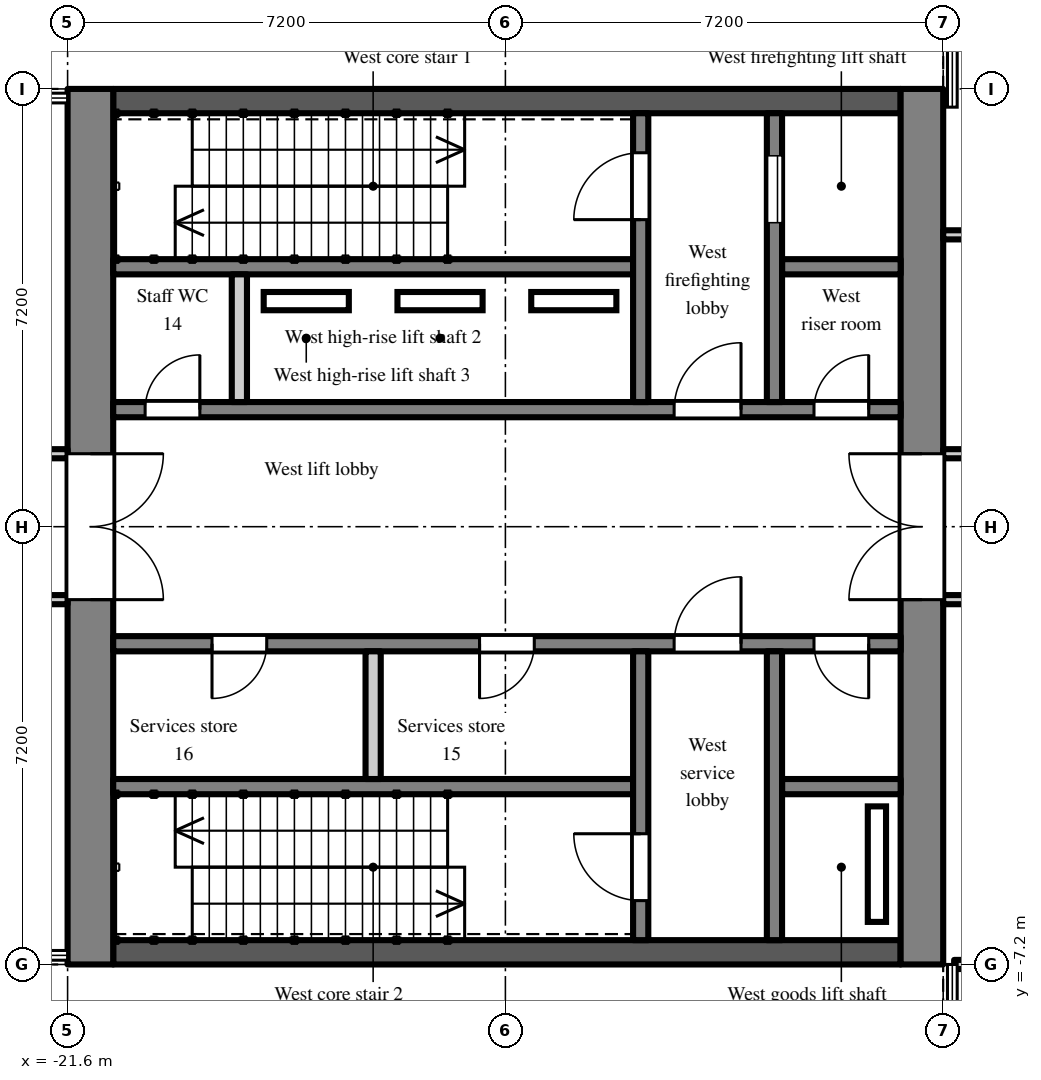
"""IFC4 building model, lengths in metres.
Left out: names, types, materials, properties, quantities, classifications, styles, units other than length and angle.
Written with IfcOpenShell. Run it as: python <this file> out.ifc"""

import sys

from ifc_helpers import new_model, si_unit, direction, frame, frame_2d, origin, place, context, subcontext, project, spatial, rectangle, extrude, element, fill, save


model = new_model("IFC4")
c1 = context("Model", 3, precision=1e-05, world=origin(), true_north=direction((0.0, 1.0)))
c2 = subcontext(c1, "Body", "Model", "MODEL_VIEW")
j1 = project(units=[si_unit("LENGTHUNIT", "METRE"), si_unit("PLANEANGLEUNIT", "RADIAN")], contexts=[c1])
p1 = place(None, origin())
s1 = spatial("IfcSite", under=j1, at=p1, CompositionType="ELEMENT")
p2 = place(p1, origin())
s2 = spatial("IfcBuilding", under=s1, at=p2, CompositionType="ELEMENT")
p3 = place(p2, frame((0.0, 0.0, 242.1)))
s3 = spatial("IfcBuildingStorey", under=s2, at=p3, CompositionType="ELEMENT", Elevation=242.1)
p4 = place(p3, frame((-7.55, -7.2, 0.0), z_axis=(0.0, 0.0, 1.0), x_axis=(0.0, 1.0, 0.0)))
e1 = element("IfcWall", 1, at=p4, inside=s3, PredefinedType="SHEAR", context=c2, shape_type="SweptSolid", body=[
    extrude(rectangle(XDim=14.4, YDim=0.7, at=frame_2d((7.2, 0.0))), origin(), (0.0, 0.0, 1.0), 4.95),
])
p5 = place(p4, frame((6.0, 0.0, 0.0)))
e2 = element("IfcOpeningElement", 2, at=p5, cuts=e1, PredefinedType="OPENING", context=c2, shape_type="SweptSolid", body=[
    extrude(rectangle(XDim=2.4, YDim=2.2, at=frame_2d((1.2, 1.1))), frame((0.0, 0.36, 0.0), z_axis=(0.0, -1.0, 0.0), x_axis=(1.0, 0.0, 0.0)), (0.0, 0.0, 1.0), 0.72),
])
p6 = place(p3, frame((-21.225, -7.2, 0.0), z_axis=(0.0, 0.0, 1.0), x_axis=(0.0, 1.0, 0.0)))
e3 = element("IfcWall", 3, at=p6, inside=s3, PredefinedType="SHEAR", context=c2, shape_type="SweptSolid", body=[
    extrude(rectangle(XDim=14.4, YDim=0.75, at=frame_2d((7.2, 0.0))), origin(), (0.0, 0.0, 1.0), 4.95),
])
p7 = place(p6, frame((6.0, 0.0, 0.0)))
e4 = element("IfcOpeningElement", 4, at=p7, cuts=e3, PredefinedType="OPENING", context=c2, shape_type="SweptSolid", body=[
    extrude(rectangle(XDim=2.4, YDim=2.2, at=frame_2d((1.2, 1.1))), frame((0.0, 0.385, 0.0), z_axis=(0.0, -1.0, 0.0), x_axis=(1.0, 0.0, 0.0)), (0.0, 0.0, 1.0), 0.77),
])
p8 = place(p3, frame((-7.9, 7.0, 0.0), z_axis=(0.0, 0.0, 1.0), x_axis=(-1.0, 0.0, 0.0)))
e5 = element("IfcWall", 5, at=p8, inside=s3, PredefinedType="SHEAR", context=c2, shape_type="SweptSolid", body=[
    extrude(rectangle(XDim=12.95, YDim=0.4, at=frame_2d((6.475, 0.0))), origin(), (0.0, 0.0, 1.0), 4.95),
])
p9 = place(p3, frame((-7.9, 1.925, 0.0), z_axis=(0.0, 0.0, 1.0), x_axis=(-1.0, 0.0, 0.0)))
e6 = element("IfcWall", 6, at=p9, inside=s3, PredefinedType="SHEAR", context=c2, shape_type="SweptSolid", body=[
    extrude(rectangle(XDim=12.95, YDim=0.25, at=frame_2d((6.475, 0.0))), origin(), (0.0, 0.0, 1.0), 4.95),
])
p10 = place(p9, frame((0.525, 0.0, 0.0)))
e7 = element("IfcOpeningElement", 7, at=p10, cuts=e6, PredefinedType="OPENING", context=c2, shape_type="SweptSolid", body=[
    extrude(rectangle(XDim=0.9, YDim=2.1, at=frame_2d((0.45, 1.05))), frame((0.0, 0.135, 0.0), z_axis=(0.0, -1.0, 0.0), x_axis=(1.0, 0.0, 0.0)), (0.0, 0.0, 1.0), 0.27),
])
p11 = place(p9, frame((2.625, 0.0, 0.0)))
e8 = element("IfcOpeningElement", 8, at=p11, cuts=e6, PredefinedType="OPENING", context=c2, shape_type="SweptSolid", body=[
    extrude(rectangle(XDim=1.1, YDim=2.1, at=frame_2d((0.55, 1.05))), frame((0.0, 0.135, 0.0), z_axis=(0.0, -1.0, 0.0), x_axis=(1.0, 0.0, 0.0)), (0.0, 0.0, 1.0), 0.27),
])
p12 = place(p9, frame((11.525, 0.0, 0.0)))
e9 = element("IfcOpeningElement", 9, at=p12, cuts=e6, PredefinedType="OPENING", context=c2, shape_type="SweptSolid", body=[
    extrude(rectangle(XDim=0.9, YDim=2.1, at=frame_2d((0.45, 1.05))), frame((0.0, 0.135, 0.0), z_axis=(0.0, -1.0, 0.0), x_axis=(1.0, 0.0, 0.0)), (0.0, 0.0, 1.0), 0.27),
])
p13 = place(p3, frame((-7.9, 4.275, 0.0), z_axis=(0.0, 0.0, 1.0), x_axis=(-1.0, 0.0, 0.0)))
e10 = element("IfcWall", 10, at=p13, inside=s3, PredefinedType="SHEAR", context=c2, shape_type="SweptSolid", body=[
    extrude(rectangle(XDim=1.95, YDim=0.25, at=frame_2d((0.975, 0.0))), origin(), (0.0, 0.0, 1.0), 4.95),
])
p14 = place(p3, frame((-12.3, 4.275, 0.0), z_axis=(0.0, 0.0, 1.0), x_axis=(-1.0, 0.0, 0.0)))
e11 = element("IfcWall", 11, at=p14, inside=s3, PredefinedType="SHEAR", context=c2, shape_type="SweptSolid", body=[
    extrude(rectangle(XDim=8.55, YDim=0.25, at=frame_2d((4.275, 0.0))), origin(), (0.0, 0.0, 1.0), 4.95),
])
p15 = place(p3, frame((-9.975, 2.05, 0.0), z_axis=(0.0, 0.0, 1.0), x_axis=(0.0, 1.0, 0.0)))
e12 = element("IfcWall", 12, at=p15, inside=s3, PredefinedType="SHEAR", context=c2, shape_type="SweptSolid", body=[
    extrude(rectangle(XDim=4.75, YDim=0.25, at=frame_2d((2.375, 0.0))), origin(), (0.0, 0.0, 1.0), 4.95),
])
p16 = place(p15, frame((2.95, 0.0, 0.0)))
e13 = element("IfcOpeningElement", 13, at=p16, cuts=e12, PredefinedType="OPENING", context=c2, shape_type="SweptSolid", body=[
    extrude(rectangle(XDim=1.1, YDim=2.1, at=frame_2d((0.55, 1.05))), frame((0.0, 0.135, 0.0), z_axis=(0.0, -1.0, 0.0), x_axis=(1.0, 0.0, 0.0)), (0.0, 0.0, 1.0), 0.27),
])
p17 = place(p3, frame((-12.175, 2.05, 0.0), z_axis=(0.0, 0.0, 1.0), x_axis=(0.0, 1.0, 0.0)))
e14 = element("IfcWall", 14, at=p17, inside=s3, PredefinedType="SHEAR", context=c2, shape_type="SweptSolid", body=[
    extrude(rectangle(XDim=4.75, YDim=0.25, at=frame_2d((2.375, 0.0))), origin(), (0.0, 0.0, 1.0), 4.95),
])
p18 = place(p17, frame((3.0, 0.0, 0.0)))
e15 = element("IfcOpeningElement", 15, at=p18, cuts=e14, PredefinedType="OPENING", context=c2, shape_type="SweptSolid", body=[
    extrude(rectangle(XDim=1.1, YDim=2.1, at=frame_2d((0.55, 1.05))), frame((0.0, 0.135, 0.0), z_axis=(0.0, -1.0, 0.0), x_axis=(1.0, 0.0, 0.0)), (0.0, 0.0, 1.0), 0.27),
])
p19 = place(p3, frame((-18.775, 2.05, 0.0), z_axis=(0.0, 0.0, 1.0), x_axis=(0.0, 1.0, 0.0)))
e16 = element("IfcWall", 16, at=p19, inside=s3, PredefinedType="PARTITIONING", context=c2, shape_type="SweptSolid", body=[
    extrude(rectangle(XDim=2.1, YDim=0.25, at=frame_2d((1.05, 0.0))), origin(), (0.0, 0.0, 1.0), 4.95),
])
p20 = place(p3, frame((-7.9, -7.0, 0.0), z_axis=(0.0, 0.0, 1.0), x_axis=(-1.0, 0.0, 0.0)))
e17 = element("IfcWall", 17, at=p20, inside=s3, PredefinedType="SHEAR", context=c2, shape_type="SweptSolid", body=[
    extrude(rectangle(XDim=12.95, YDim=0.4, at=frame_2d((6.475, 0.0))), origin(), (0.0, 0.0, 1.0), 4.95),
])
p21 = place(p3, frame((-7.9, -1.925, 0.0), z_axis=(0.0, 0.0, 1.0), x_axis=(-1.0, 0.0, 0.0)))
e18 = element("IfcWall", 18, at=p21, inside=s3, PredefinedType="SHEAR", context=c2, shape_type="SweptSolid", body=[
    extrude(rectangle(XDim=12.95, YDim=0.25, at=frame_2d((6.475, 0.0))), origin(), (0.0, 0.0, 1.0), 4.95),
])
p22 = place(p21, frame((0.525, 0.0, 0.0)))
e19 = element("IfcOpeningElement", 19, at=p22, cuts=e18, PredefinedType="OPENING", context=c2, shape_type="SweptSolid", body=[
    extrude(rectangle(XDim=0.9, YDim=2.1, at=frame_2d((0.45, 1.05))), frame((0.0, 0.135, 0.0), z_axis=(0.0, -1.0, 0.0), x_axis=(1.0, 0.0, 0.0)), (0.0, 0.0, 1.0), 0.27),
])
p23 = place(p21, frame((2.625, 0.0, 0.0)))
e20 = element("IfcOpeningElement", 20, at=p23, cuts=e18, PredefinedType="OPENING", context=c2, shape_type="SweptSolid", body=[
    extrude(rectangle(XDim=1.1, YDim=2.1, at=frame_2d((0.55, 1.05))), frame((0.0, 0.135, 0.0), z_axis=(0.0, -1.0, 0.0), x_axis=(1.0, 0.0, 0.0)), (0.0, 0.0, 1.0), 0.27),
])
p24 = place(p21, frame((6.025, 0.0, 0.0)))
e21 = element("IfcOpeningElement", 21, at=p24, cuts=e18, PredefinedType="OPENING", context=c2, shape_type="SweptSolid", body=[
    extrude(rectangle(XDim=0.9, YDim=2.1, at=frame_2d((0.45, 1.05))), frame((0.0, 0.135, 0.0), z_axis=(0.0, -1.0, 0.0), x_axis=(1.0, 0.0, 0.0)), (0.0, 0.0, 1.0), 0.27),
])
p25 = place(p21, frame((10.425, 0.0, 0.0)))
e22 = element("IfcOpeningElement", 22, at=p25, cuts=e18, PredefinedType="OPENING", context=c2, shape_type="SweptSolid", body=[
    extrude(rectangle(XDim=0.9, YDim=2.1, at=frame_2d((0.45, 1.05))), frame((0.0, 0.135, 0.0), z_axis=(0.0, -1.0, 0.0), x_axis=(1.0, 0.0, 0.0)), (0.0, 0.0, 1.0), 0.27),
])
p26 = place(p3, frame((-7.9, -4.275, 0.0), z_axis=(0.0, 0.0, 1.0), x_axis=(-1.0, 0.0, 0.0)))
e23 = element("IfcWall", 23, at=p26, inside=s3, PredefinedType="SHEAR", context=c2, shape_type="SweptSolid", body=[
    extrude(rectangle(XDim=1.95, YDim=0.25, at=frame_2d((0.975, 0.0))), origin(), (0.0, 0.0, 1.0), 4.95),
])
p27 = place(p3, frame((-12.3, -4.275, 0.0), z_axis=(0.0, 0.0, 1.0), x_axis=(-1.0, 0.0, 0.0)))
e24 = element("IfcWall", 24, at=p27, inside=s3, PredefinedType="SHEAR", context=c2, shape_type="SweptSolid", body=[
    extrude(rectangle(XDim=8.55, YDim=0.25, at=frame_2d((4.275, 0.0))), origin(), (0.0, 0.0, 1.0), 4.95),
])
p28 = place(p3, frame((-9.975, -2.05, 0.0), z_axis=(0.0, 0.0, 1.0), x_axis=(0.0, -1.0, 0.0)))
e25 = element("IfcWall", 25, at=p28, inside=s3, PredefinedType="SHEAR", context=c2, shape_type="SweptSolid", body=[
    extrude(rectangle(XDim=4.75, YDim=0.25, at=frame_2d((2.375, 0.0))), origin(), (0.0, 0.0, 1.0), 4.95),
])
p29 = place(p3, frame((-12.175, -2.05, 0.0), z_axis=(0.0, 0.0, 1.0), x_axis=(0.0, -1.0, 0.0)))
e26 = element("IfcWall", 26, at=p29, inside=s3, PredefinedType="SHEAR", context=c2, shape_type="SweptSolid", body=[
    extrude(rectangle(XDim=4.75, YDim=0.25, at=frame_2d((2.375, 0.0))), origin(), (0.0, 0.0, 1.0), 4.95),
])
p30 = place(p29, frame((3.0, 0.0, 0.0)))
e27 = element("IfcOpeningElement", 27, at=p30, cuts=e26, PredefinedType="OPENING", context=c2, shape_type="SweptSolid", body=[
    extrude(rectangle(XDim=1.1, YDim=2.1, at=frame_2d((0.55, 1.05))), frame((0.0, 0.135, 0.0), z_axis=(0.0, -1.0, 0.0), x_axis=(1.0, 0.0, 0.0)), (0.0, 0.0, 1.0), 0.27),
])
p31 = place(p3, frame((-16.575, -2.05, 0.0), z_axis=(0.0, 0.0, 1.0), x_axis=(0.0, -1.0, 0.0)))
e28 = element("IfcWall", 28, at=p31, inside=s3, PredefinedType="PARTITIONING", context=c2, shape_type="SweptSolid", body=[
    extrude(rectangle(XDim=2.1, YDim=0.25, at=frame_2d((1.05, 0.0))), origin(), (0.0, 0.0, 1.0), 4.95),
])
p32 = place(p3, frame((-25.125, -1.2, 0.0), z_axis=(0.0, 0.0, 1.0), x_axis=(1.0, 0.0, 0.0)))
e29 = element("IfcWall", 29, at=p32, inside=s3, PredefinedType="PARTITIONING", context=c2, shape_type="SweptSolid", body=[
    extrude(rectangle(XDim=3.525, YDim=0.15, at=frame_2d((1.762, 0.0))), origin(), (0.0, 0.0, 1.0), 4.95),
])
p33 = place(p32, frame((1.125, 0.0, 0.0)))
e30 = element("IfcOpeningElement", 30, at=p33, cuts=e29, PredefinedType="OPENING", context=c2, shape_type="SweptSolid", body=[
    extrude(rectangle(XDim=1.2, YDim=2.1, at=frame_2d((0.6, 1.05))), frame((0.0, 0.085, 0.0), z_axis=(0.0, -1.0, 0.0), x_axis=(1.0, 0.0, 0.0)), (0.0, 0.0, 1.0), 0.17),
])
p34 = place(p3, frame((-25.125, 1.2, 0.0), z_axis=(0.0, 0.0, 1.0), x_axis=(1.0, 0.0, 0.0)))
e31 = element("IfcWall", 31, at=p34, inside=s3, PredefinedType="PARTITIONING", context=c2, shape_type="SweptSolid", body=[
    extrude(rectangle(XDim=3.525, YDim=0.15, at=frame_2d((1.762, 0.0))), origin(), (0.0, 0.0, 1.0), 4.95),
])
p35 = place(p34, frame((1.125, 0.0, 0.0)))
e32 = element("IfcOpeningElement", 32, at=p35, cuts=e31, PredefinedType="OPENING", context=c2, shape_type="SweptSolid", body=[
    extrude(rectangle(XDim=1.2, YDim=2.1, at=frame_2d((0.6, 1.05))), frame((0.0, 0.085, 0.0), z_axis=(0.0, -1.0, 0.0), x_axis=(1.0, 0.0, 0.0)), (0.0, 0.0, 1.0), 0.17),
])
p36 = place(p3, frame((-7.2, -1.2, 0.0), z_axis=(0.0, 0.0, 1.0), x_axis=(1.0, 0.0, 0.0)))
e33 = element("IfcWall", 33, at=p36, inside=s3, PredefinedType="PARTITIONING", context=c2, shape_type="SweptSolid", body=[
    extrude(rectangle(XDim=6.075, YDim=0.15, at=frame_2d((3.038, 0.0))), origin(), (0.0, 0.0, 1.0), 4.95),
])
p37 = place(p36, frame((4.7, 0.0, 0.0)))
e34 = element("IfcOpeningElement", 34, at=p37, cuts=e33, PredefinedType="OPENING", context=c2, shape_type="SweptSolid", body=[
    extrude(rectangle(XDim=1.2, YDim=2.1, at=frame_2d((0.6, 1.05))), frame((0.0, 0.085, 0.0), z_axis=(0.0, -1.0, 0.0), x_axis=(1.0, 0.0, 0.0)), (0.0, 0.0, 1.0), 0.17),
])
p38 = place(p3, frame((-7.2, 1.2, 0.0), z_axis=(0.0, 0.0, 1.0), x_axis=(1.0, 0.0, 0.0)))
e35 = element("IfcWall", 35, at=p38, inside=s3, PredefinedType="PARTITIONING", context=c2, shape_type="SweptSolid", body=[
    extrude(rectangle(XDim=14.4, YDim=0.15, at=frame_2d((7.2, 0.0))), origin(), (0.0, 0.0, 1.0), 4.95),
])
p39 = place(p38, frame((6.3, 0.0, 0.0)))
e36 = element("IfcOpeningElement", 36, at=p39, cuts=e35, PredefinedType="OPENING", context=c2, shape_type="SweptSolid", body=[
    extrude(rectangle(XDim=1.8, YDim=2.1, at=frame_2d((0.9, 1.05))), frame((0.0, 0.085, 0.0), z_axis=(0.0, -1.0, 0.0), x_axis=(1.0, 0.0, 0.0)), (0.0, 0.0, 1.0), 0.17),
])
p40 = place(p3, frame((-7.2, 4.8, 0.0), z_axis=(0.0, 0.0, 1.0), x_axis=(1.0, 0.0, 0.0)))
e37 = element("IfcWall", 37, at=p40, inside=s3, PredefinedType="PARTITIONING", context=c2, shape_type="SweptSolid", body=[
    extrude(rectangle(XDim=14.4, YDim=0.15, at=frame_2d((7.2, 0.0))), origin(), (0.0, 0.0, 1.0), 4.95),
])
p41 = place(p40, frame((6.3, 0.0, 0.0)))
e38 = element("IfcOpeningElement", 38, at=p41, cuts=e37, PredefinedType="OPENING", context=c2, shape_type="SweptSolid", body=[
    extrude(rectangle(XDim=1.8, YDim=2.1, at=frame_2d((0.9, 1.05))), frame((0.0, 0.085, 0.0), z_axis=(0.0, -1.0, 0.0), x_axis=(1.0, 0.0, 0.0)), (0.0, 0.0, 1.0), 0.17),
])
p42 = place(p3, frame((-7.02, -7.2, 0.0), z_axis=(0.0, 0.0, 1.0), x_axis=(1.0, 0.0, 0.0)))
e39 = element("IfcWall", 39, at=p42, inside=s3, PredefinedType="PARTITIONING", context=c2, shape_type="SweptSolid", body=[
    extrude(rectangle(XDim=5.745, YDim=0.15, at=frame_2d((2.873, 0.0))), origin(), (0.0, 0.0, 1.0), 4.95),
])
p43 = place(p16, origin())
e40 = element("IfcDoor", 40, at=p43, inside=s3, OperationType="SLIDING_TO_LEFT", PredefinedType="DOOR", context=c2, shape_type="SweptSolid", body=[
    extrude(rectangle(XDim=1.1, YDim=2.1, at=frame_2d((0.55, 1.05))), frame((0.0, 0.025, 0.0), z_axis=(0.0, -1.0, 0.0), x_axis=(1.0, 0.0, 0.0)), (0.0, 0.0, 1.0), 0.05),
])
fill(e13, e40)
p44 = place(p18, origin())
e41 = element("IfcDoor", 41, at=p44, inside=s3, OperationType="SINGLE_SWING_LEFT", PredefinedType="DOOR", context=c2, shape_type="SweptSolid", body=[
    extrude(rectangle(XDim=1.1, YDim=2.1, at=frame_2d((0.55, 1.05))), frame((0.0, 0.025, 0.0), z_axis=(0.0, -1.0, 0.0), x_axis=(1.0, 0.0, 0.0)), (0.0, 0.0, 1.0), 0.05),
])
fill(e15, e41)
p45 = place(p30, frame((1.1, 0.0, 0.0), z_axis=(0.0, 0.0, 1.0), x_axis=(-1.0, 0.0, 0.0)))
e42 = element("IfcDoor", 42, at=p45, inside=s3, OperationType="SINGLE_SWING_RIGHT", PredefinedType="DOOR", context=c2, shape_type="SweptSolid", body=[
    extrude(rectangle(XDim=1.1, YDim=2.1, at=frame_2d((0.55, 1.05))), frame((0.0, 0.025, 0.0), z_axis=(0.0, -1.0, 0.0), x_axis=(1.0, 0.0, 0.0)), (0.0, 0.0, 1.0), 0.05),
])
fill(e27, e42)
p46 = place(p10, frame((0.9, 0.0, 0.0), z_axis=(0.0, 0.0, 1.0), x_axis=(-1.0, 0.0, 0.0)))
e43 = element("IfcDoor", 43, at=p46, inside=s3, OperationType="SINGLE_SWING_RIGHT", PredefinedType="DOOR", context=c2, shape_type="SweptSolid", body=[
    extrude(rectangle(XDim=0.9, YDim=2.1, at=frame_2d((0.45, 1.05))), frame((0.0, 0.025, 0.0), z_axis=(0.0, -1.0, 0.0), x_axis=(1.0, 0.0, 0.0)), (0.0, 0.0, 1.0), 0.05),
])
fill(e7, e43)
p47 = place(p22, origin())
e44 = element("IfcDoor", 44, at=p47, inside=s3, OperationType="SINGLE_SWING_LEFT", PredefinedType="DOOR", context=c2, shape_type="SweptSolid", body=[
    extrude(rectangle(XDim=0.9, YDim=2.1, at=frame_2d((0.45, 1.05))), frame((0.0, 0.025, 0.0), z_axis=(0.0, -1.0, 0.0), x_axis=(1.0, 0.0, 0.0)), (0.0, 0.0, 1.0), 0.05),
])
fill(e19, e44)
p48 = place(p11, frame((1.1, 0.0, 0.0), z_axis=(0.0, 0.0, 1.0), x_axis=(-1.0, 0.0, 0.0)))
e45 = element("IfcDoor", 45, at=p48, inside=s3, OperationType="SINGLE_SWING_RIGHT", PredefinedType="DOOR", context=c2, shape_type="SweptSolid", body=[
    extrude(rectangle(XDim=1.1, YDim=2.1, at=frame_2d((0.55, 1.05))), frame((0.0, 0.025, 0.0), z_axis=(0.0, -1.0, 0.0), x_axis=(1.0, 0.0, 0.0)), (0.0, 0.0, 1.0), 0.05),
])
fill(e8, e45)
p49 = place(p23, frame((1.1, 0.0, 0.0), z_axis=(0.0, 0.0, 1.0), x_axis=(-1.0, 0.0, 0.0)))
e46 = element("IfcDoor", 46, at=p49, inside=s3, OperationType="SINGLE_SWING_RIGHT", PredefinedType="DOOR", context=c2, shape_type="SweptSolid", body=[
    extrude(rectangle(XDim=1.1, YDim=2.1, at=frame_2d((0.55, 1.05))), frame((0.0, 0.025, 0.0), z_axis=(0.0, -1.0, 0.0), x_axis=(1.0, 0.0, 0.0)), (0.0, 0.0, 1.0), 0.05),
])
fill(e20, e46)
p50 = place(p5, origin())
e47 = element("IfcDoor", 47, at=p50, inside=s3, OperationType="DOUBLE_DOOR_DOUBLE_SWING", PredefinedType="DOOR", context=c2, shape_type="SweptSolid", body=[
    extrude(rectangle(XDim=2.4, YDim=2.2, at=frame_2d((1.2, 1.1))), frame((0.0, 0.025, 0.0), z_axis=(0.0, -1.0, 0.0), x_axis=(1.0, 0.0, 0.0)), (0.0, 0.0, 1.0), 0.05),
])
fill(e2, e47)
p51 = place(p7, frame((2.4, 0.0, 0.0), z_axis=(0.0, 0.0, 1.0), x_axis=(-1.0, 0.0, 0.0)))
e48 = element("IfcDoor", 48, at=p51, inside=s3, OperationType="DOUBLE_DOOR_DOUBLE_SWING", PredefinedType="DOOR", context=c2, shape_type="SweptSolid", body=[
    extrude(rectangle(XDim=2.4, YDim=2.2, at=frame_2d((1.2, 1.1))), frame((0.0, 0.025, 0.0), z_axis=(0.0, -1.0, 0.0), x_axis=(1.0, 0.0, 0.0)), (0.0, 0.0, 1.0), 0.05),
])
fill(e4, e48)
p52 = place(p12, frame((0.9, 0.0, 0.0), z_axis=(0.0, 0.0, 1.0), x_axis=(-1.0, 0.0, 0.0)))
e49 = element("IfcDoor", 49, at=p52, inside=s3, OperationType="SINGLE_SWING_RIGHT", PredefinedType="DOOR", context=c2, shape_type="SweptSolid", body=[
    extrude(rectangle(XDim=0.9, YDim=2.1, at=frame_2d((0.45, 1.05))), frame((0.0, 0.025, 0.0), z_axis=(0.0, -1.0, 0.0), x_axis=(1.0, 0.0, 0.0)), (0.0, 0.0, 1.0), 0.05),
])
fill(e9, e49)
p53 = place(p24, origin())
e50 = element("IfcDoor", 50, at=p53, inside=s3, OperationType="SINGLE_SWING_RIGHT", PredefinedType="DOOR", context=c2, shape_type="SweptSolid", body=[
    extrude(rectangle(XDim=0.9, YDim=2.1, at=frame_2d((0.45, 1.05))), frame((0.0, 0.025, 0.0), z_axis=(0.0, -1.0, 0.0), x_axis=(1.0, 0.0, 0.0)), (0.0, 0.0, 1.0), 0.05),
])
fill(e21, e50)
p54 = place(p25, origin())
e51 = element("IfcDoor", 51, at=p54, inside=s3, OperationType="SINGLE_SWING_RIGHT", PredefinedType="DOOR", context=c2, shape_type="SweptSolid", body=[
    extrude(rectangle(XDim=0.9, YDim=2.1, at=frame_2d((0.45, 1.05))), frame((0.0, 0.025, 0.0), z_axis=(0.0, -1.0, 0.0), x_axis=(1.0, 0.0, 0.0)), (0.0, 0.0, 1.0), 0.05),
])
fill(e22, e51)
save(model, sys.argv[1])
